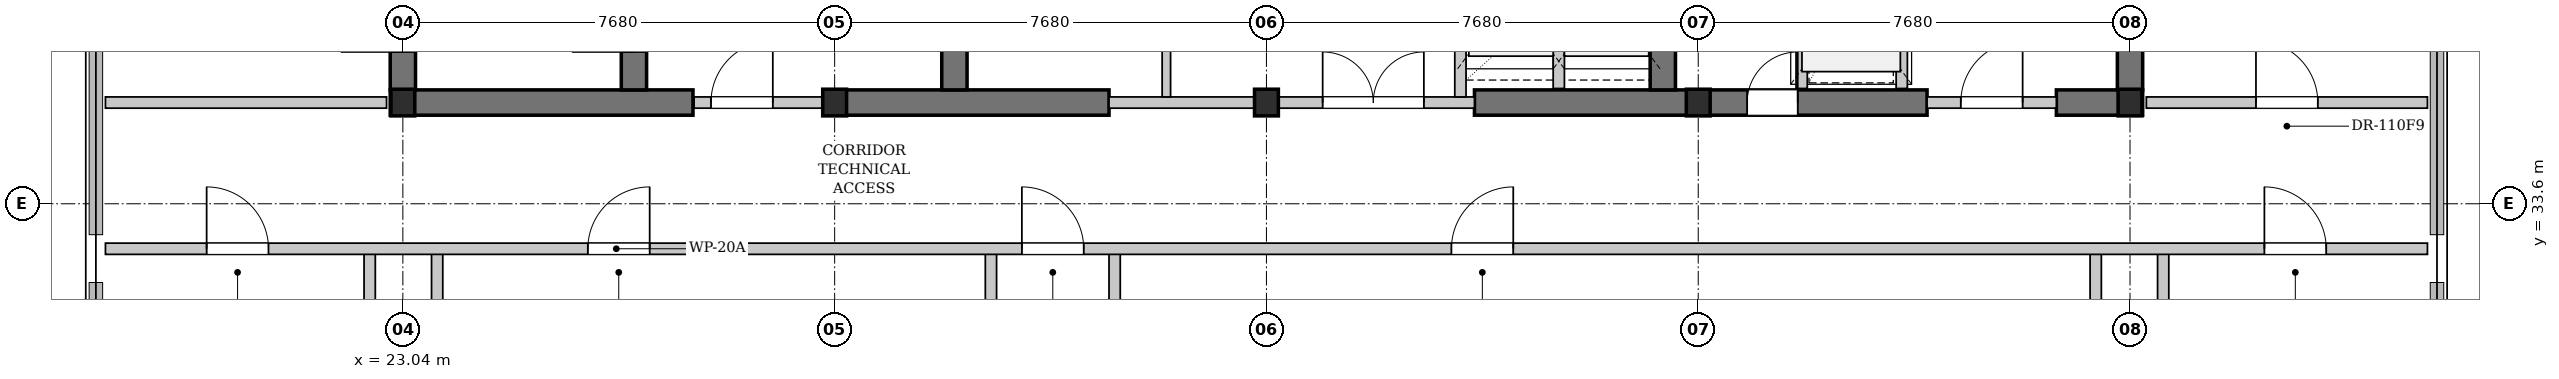
"""IFC4 building model, lengths in metres.
Left out: names, types, materials, properties, quantities, classifications, styles, units other than length and angle.
Written with IfcOpenShell. Run it as: python <this file> out.ifc"""

import sys

from ifc_helpers import new_model, si_unit, direction, frame, frame_2d, origin, origin_2d, place, context, subcontext, project, spatial, rectangle, i_section, extrude, element, fill, save


model = new_model("IFC4")
c1 = context("Model", 3, precision=1e-05, world=origin(), true_north=direction((0.0, 1.0)))
c2 = subcontext(c1, "Body", "Model", "MODEL_VIEW")
j1 = project(units=[si_unit("LENGTHUNIT", "METRE"), si_unit("PLANEANGLEUNIT", "RADIAN")], contexts=[c1])
p1 = place(None, origin())
s1 = spatial("IfcSite", under=j1, at=p1, CompositionType="ELEMENT")
p2 = place(p1, origin())
s2 = spatial("IfcBuilding", under=s1, at=p2, CompositionType="ELEMENT")
p3 = place(p2, frame((0.0, 0.0, 137.3)))
s3 = spatial("IfcBuildingStorey", under=s2, at=p3, CompositionType="ELEMENT", Elevation=137.3)
p4 = place(p3, frame((22.815, 35.4, 0.0), z_axis=(0.0, 0.0, 1.0), x_axis=(1.0, 0.0, 0.0)))
e1 = element("IfcWall", 1, at=p4, inside=s3, PredefinedType="SHEAR", context=c2, shape_type="SweptSolid", body=[
    extrude(rectangle(XDim=5.385, YDim=0.45, at=frame_2d((2.692, 0.0))), origin(), (0.0, 0.0, 1.0), 3.68),
])
p5 = place(p3, frame((30.72, 35.4, 0.0), z_axis=(0.0, 0.0, 1.0), x_axis=(1.0, 0.0, 0.0)))
e2 = element("IfcWall", 2, at=p5, inside=s3, PredefinedType="SHEAR", context=c2, shape_type="SweptSolid", body=[
    extrude(rectangle(XDim=4.88, YDim=0.45, at=frame_2d((2.44, 0.0))), origin(), (0.0, 0.0, 1.0), 3.68),
])
p6 = place(p3, frame((42.1, 35.4, 0.0), z_axis=(0.0, 0.0, 1.0), x_axis=(1.0, 0.0, 0.0)))
e3 = element("IfcWall", 3, at=p6, inside=s3, PredefinedType="SHEAR", context=c2, shape_type="SweptSolid", body=[
    extrude(rectangle(XDim=8.05, YDim=0.45, at=frame_2d((4.025, 0.0))), origin(), (0.0, 0.0, 1.0), 3.68),
])
p7 = place(p6, frame((4.85, 0.0, 0.0)))
e4 = element("IfcOpeningElement", 4, at=p7, cuts=e3, PredefinedType="OPENING", context=c2, shape_type="SweptSolid", body=[
    extrude(rectangle(XDim=0.9, YDim=2.15, at=frame_2d((0.45, 1.075))), frame((0.0, 0.235, 0.0), z_axis=(0.0, -1.0, 0.0), x_axis=(1.0, 0.0, 0.0)), (0.0, 0.0, 1.0), 0.47),
])
p8 = place(p3, frame((52.45, 35.4, 0.0), z_axis=(0.0, 0.0, 1.0), x_axis=(1.0, 0.0, 0.0)))
e5 = element("IfcWall", 5, at=p8, inside=s3, PredefinedType="SHEAR", context=c2, shape_type="SweptSolid", body=[
    extrude(rectangle(XDim=1.535, YDim=0.45, at=frame_2d((0.768, 0.0))), origin(), (0.0, 0.0, 1.0), 3.68),
])
p9 = place(p3, frame((23.04, 35.625, 0.0), z_axis=(0.0, 0.0, 1.0), x_axis=(0.0, 1.0, 0.0)))
e6 = element("IfcWall", 6, at=p9, inside=s3, PredefinedType="SHEAR", context=c2, shape_type="SweptSolid", body=[
    extrude(rectangle(XDim=10.35, YDim=0.45, at=frame_2d((5.175, 0.0))), origin(), (0.0, 0.0, 1.0), 3.68),
])
p10 = place(p9, frame((0.675, 0.0, 0.0)))
e7 = element("IfcOpeningElement", 7, at=p10, cuts=e6, PredefinedType="OPENING", context=c2, shape_type="SweptSolid", body=[
    extrude(rectangle(XDim=1.1, YDim=2.15, at=frame_2d((0.55, 1.075))), frame((0.0, 0.235, 0.0), z_axis=(0.0, -1.0, 0.0), x_axis=(1.0, 0.0, 0.0)), (0.0, 0.0, 1.0), 0.47),
])
p11 = place(p3, frame((27.15, 35.625, 0.0), z_axis=(0.0, 0.0, 1.0), x_axis=(0.0, 1.0, 0.0)))
e8 = element("IfcWall", 8, at=p11, inside=s3, PredefinedType="SHEAR", context=c2, shape_type="SweptSolid", body=[
    extrude(rectangle(XDim=10.35, YDim=0.45, at=frame_2d((5.175, 0.0))), origin(), (0.0, 0.0, 1.0), 3.68),
])
p12 = place(p11, frame((0.675, 0.0, 0.0)))
e9 = element("IfcOpeningElement", 9, at=p12, cuts=e8, PredefinedType="OPENING", context=c2, shape_type="SweptSolid", body=[
    extrude(rectangle(XDim=1.1, YDim=2.15, at=frame_2d((0.55, 1.075))), frame((0.0, 0.235, 0.0), z_axis=(0.0, -1.0, 0.0), x_axis=(1.0, 0.0, 0.0)), (0.0, 0.0, 1.0), 0.47),
])
for number, where, z_axis, x_axis in (
    (10, (32.85, 35.625, 0.0), (0.0, 0.0, 1.0), (0.0, 1.0, 0.0)),
    (11, (45.45, 35.625, 0.0), (0.0, 0.0, 1.0), (0.0, 1.0, 0.0)),
    (12, (53.76, 35.625, 0.0), (0.0, 0.0, 1.0), (0.0, 1.0, 0.0)),
):
    element("IfcWall", number, at=place(p3, frame(where, z_axis=z_axis, x_axis=x_axis)), inside=s3, PredefinedType="SHEAR", context=c2, shape_type="SweptSolid", body=[
        extrude(rectangle(XDim=10.35, YDim=0.45, at=frame_2d((5.175, 0.0))), origin(), (0.0, 0.0, 1.0), 3.68),
    ])
for number, where, z_axis, x_axis in (
    (13, (23.04, 35.4, 0.0), (0.0, 0.0, 1.0), (1.0, 0.0, 0.0)),
    (14, (30.72, 35.4, 0.0), (0.0, 0.0, 1.0), (1.0, 0.0, 0.0)),
    (15, (38.4, 35.4, 0.0), (0.0, 0.0, 1.0), (1.0, 0.0, 0.0)),
    (16, (46.08, 35.4, 0.0), (0.0, 0.0, 1.0), (1.0, 0.0, 0.0)),
    (17, (53.76, 35.4, 0.0), (0.0, 0.0, 1.0), (1.0, 0.0, 0.0)),
):
    element("IfcColumn", number, at=place(p3, frame(where, z_axis=z_axis, x_axis=x_axis)), inside=s3, PredefinedType="COLUMN", context=c2, shape_type="SweptSolid", body=[
        extrude(i_section(OverallWidth=0.424, OverallDepth=0.474, WebThickness=0.047, FlangeThickness=0.077, FilletRadius=0.015, at=origin_2d()), origin(), (0.0, 0.0, 1.0), 3.9),
    ])
p13 = place(p3, frame((28.22, 35.4, 0.0), z_axis=(0.0, 0.0, 1.0), x_axis=(1.0, 0.0, 0.0)))
e18 = element("IfcWall", 18, at=p13, inside=s3, PredefinedType="PARTITIONING", context=c2, shape_type="SweptSolid", body=[
    extrude(rectangle(XDim=2.5, YDim=0.2, at=frame_2d((1.25, 0.0))), origin(), (0.0, 0.0, 1.0), 2.765),
])
p14 = place(p13, frame((0.3, 0.0, 0.0)))
e19 = element("IfcOpeningElement", 19, at=p14, cuts=e18, PredefinedType="OPENING", context=c2, shape_type="SweptSolid", body=[
    extrude(rectangle(XDim=1.1, YDim=2.15, at=frame_2d((0.55, 1.075))), frame((0.0, 0.11, 0.0), z_axis=(0.0, -1.0, 0.0), x_axis=(1.0, 0.0, 0.0)), (0.0, 0.0, 1.0), 0.22),
])
p15 = place(p3, frame((35.6, 35.4, 0.0), z_axis=(0.0, 0.0, 1.0), x_axis=(1.0, 0.0, 0.0)))
e20 = element("IfcWall", 20, at=p15, inside=s3, PredefinedType="PARTITIONING", context=c2, shape_type="SweptSolid", body=[
    extrude(rectangle(XDim=6.5, YDim=0.2, at=frame_2d((3.25, 0.0))), origin(), (0.0, 0.0, 1.0), 2.765),
])
p16 = place(p15, frame((3.8, 0.0, 0.0)))
e21 = element("IfcOpeningElement", 21, at=p16, cuts=e20, PredefinedType="OPENING", context=c2, shape_type="SweptSolid", body=[
    extrude(rectangle(XDim=1.8, YDim=2.3, at=frame_2d((0.9, 1.15))), frame((0.0, 0.11, 0.0), z_axis=(0.0, -1.0, 0.0), x_axis=(1.0, 0.0, 0.0)), (0.0, 0.0, 1.0), 0.22),
])
p17 = place(p3, frame((36.62, 35.5, 0.0), z_axis=(0.0, 0.0, 1.0), x_axis=(0.0, 1.0, 0.0)))
e22 = element("IfcWall", 22, at=p17, inside=s3, PredefinedType="PARTITIONING", context=c2, shape_type="SweptSolid", body=[
    extrude(rectangle(XDim=10.42, YDim=0.15, at=frame_2d((5.21, 0.0))), origin(), (0.0, 0.0, 1.0), 3.68),
])
p18 = place(p17, frame((3.92, 0.0, 0.0)))
e23 = element("IfcOpeningElement", 23, at=p18, cuts=e22, PredefinedType="OPENING", context=c2, shape_type="SweptSolid", body=[
    extrude(rectangle(XDim=0.9, YDim=2.15, at=frame_2d((0.45, 1.075))), frame((0.0, 0.085, 0.0), z_axis=(0.0, -1.0, 0.0), x_axis=(1.0, 0.0, 0.0)), (0.0, 0.0, 1.0), 0.17),
])
p19 = place(p17, frame((5.85, 0.0, 0.0)))
e24 = element("IfcOpeningElement", 24, at=p19, cuts=e22, PredefinedType="OPENING", context=c2, shape_type="SweptSolid", body=[
    extrude(rectangle(XDim=0.9, YDim=2.15, at=frame_2d((0.45, 1.075))), frame((0.0, 0.085, 0.0), z_axis=(0.0, -1.0, 0.0), x_axis=(1.0, 0.0, 0.0)), (0.0, 0.0, 1.0), 0.17),
])
p20 = place(p3, frame((43.6, 35.65, 0.0), z_axis=(0.0, 0.0, 1.0), x_axis=(0.0, 1.0, 0.0)))
e25 = element("IfcWall", 25, at=p20, inside=s3, PredefinedType="PARTITIONING", context=c2, shape_type="SweptSolid", body=[
    extrude(rectangle(XDim=3.25, YDim=0.2, at=frame_2d((1.625, 0.0))), origin(), (0.0, 0.0, 1.0), 3.68),
])
p21 = place(p3, frame((41.85, 35.5, 0.0), z_axis=(0.0, 0.0, 1.0), x_axis=(0.0, 1.0, 0.0)))
e26 = element("IfcWall", 26, at=p21, inside=s3, PredefinedType="PARTITIONING", context=c2, shape_type="SweptSolid", body=[
    extrude(rectangle(XDim=3.4, YDim=0.2, at=frame_2d((1.7, 0.0))), origin(), (0.0, 0.0, 1.0), 3.68),
])
p22 = place(p3, frame((50.15, 35.4, 0.0), z_axis=(0.0, 0.0, 1.0), x_axis=(1.0, 0.0, 0.0)))
e27 = element("IfcWall", 27, at=p22, inside=s3, PredefinedType="PARTITIONING", context=c2, shape_type="SweptSolid", body=[
    extrude(rectangle(XDim=2.3, YDim=0.2, at=frame_2d((1.15, 0.0))), origin(), (0.0, 0.0, 1.0), 2.765),
])
p23 = place(p22, frame((0.6, 0.0, 0.0)))
e28 = element("IfcOpeningElement", 28, at=p23, cuts=e27, PredefinedType="OPENING", context=c2, shape_type="SweptSolid", body=[
    extrude(rectangle(XDim=1.1, YDim=2.15, at=frame_2d((0.55, 1.075))), frame((0.0, 0.11, 0.0), z_axis=(0.0, -1.0, 0.0), x_axis=(1.0, 0.0, 0.0)), (0.0, 0.0, 1.0), 0.22),
])
p24 = place(p3, frame((49.7, 35.65, 0.0), z_axis=(0.0, 0.0, 1.0), x_axis=(0.0, 1.0, 0.0)))
e29 = element("IfcWall", 29, at=p24, inside=s3, PredefinedType="PARTITIONING", context=c2, shape_type="SweptSolid", body=[
    extrude(rectangle(XDim=3.15, YDim=0.2, at=frame_2d((1.575, 0.0))), origin(), (0.0, 0.0, 1.0), 3.68),
])
p25 = place(p24, frame((0.85, 0.0, 0.0)))
e30 = element("IfcOpeningElement", 30, at=p25, cuts=e29, PredefinedType="OPENING", context=c2, shape_type="SweptSolid", body=[
    extrude(rectangle(XDim=1.2, YDim=2.2, at=frame_2d((0.6, 1.1))), frame((0.0, 0.11, 0.0), z_axis=(0.0, -1.0, 0.0), x_axis=(1.0, 0.0, 0.0)), (0.0, 0.0, 1.0), 0.22),
])
p26 = place(p3, frame((47.92, 35.65, 0.0), z_axis=(0.0, 0.0, 1.0), x_axis=(0.0, 1.0, 0.0)))
e31 = element("IfcWall", 31, at=p26, inside=s3, PredefinedType="PARTITIONING", context=c2, shape_type="SweptSolid", body=[
    extrude(rectangle(XDim=3.15, YDim=0.2, at=frame_2d((1.575, 0.0))), origin(), (0.0, 0.0, 1.0), 3.68),
])
p27 = place(p3, frame((17.75, 35.4, 0.0), z_axis=(0.0, 0.0, 1.0), x_axis=(1.0, 0.0, 0.0)))
e32 = element("IfcWall", 32, at=p27, inside=s3, PredefinedType="PARTITIONING", context=c2, shape_type="SweptSolid", body=[
    extrude(rectangle(XDim=5.0, YDim=0.2, at=frame_2d((2.5, 0.0))), origin(), (0.0, 0.0, 1.0), 3.68),
])
p28 = place(p3, frame((54.05, 35.4, 0.0), z_axis=(0.0, 0.0, 1.0), x_axis=(1.0, 0.0, 0.0)))
e33 = element("IfcWall", 33, at=p28, inside=s3, PredefinedType="PARTITIONING", context=c2, shape_type="SweptSolid", body=[
    extrude(rectangle(XDim=5.0, YDim=0.2, at=frame_2d((2.5, 0.0))), origin(), (0.0, 0.0, 1.0), 3.68),
])
p29 = place(p28, frame((1.95, 0.0, 0.0)))
e34 = element("IfcOpeningElement", 34, at=p29, cuts=e33, PredefinedType="OPENING", context=c2, shape_type="SweptSolid", body=[
    extrude(rectangle(XDim=1.1, YDim=2.15, at=frame_2d((0.55, 1.075))), frame((0.0, 0.11, 0.0), z_axis=(0.0, -1.0, 0.0), x_axis=(1.0, 0.0, 0.0)), (0.0, 0.0, 1.0), 0.22),
])
for number, where, z_axis, x_axis in (
    (35, (22.45, 22.98, 0.0), (0.0, 0.0, 1.0), (0.0, 1.0, 0.0)),
    (36, (23.65, 22.98, 0.0), (0.0, 0.0, 1.0), (0.0, 1.0, 0.0)),
    (37, (53.15, 22.98, 0.0), (0.0, 0.0, 1.0), (0.0, 1.0, 0.0)),
    (38, (54.35, 22.98, 0.0), (0.0, 0.0, 1.0), (0.0, 1.0, 0.0)),
):
    element("IfcWall", number, at=place(p3, frame(where, z_axis=z_axis, x_axis=x_axis)), inside=s3, PredefinedType="PARTITIONING", context=c2, shape_type="SweptSolid", body=[
        extrude(rectangle(XDim=9.82, YDim=0.2, at=frame_2d((4.91, 0.0))), origin(), (0.0, 0.0, 1.0), 3.68),
    ])
for number, where, z_axis, x_axis in (
    (39, (33.5, 24.85, 0.0), (0.0, 0.0, 1.0), (0.0, 1.0, 0.0)),
    (40, (35.7, 24.85, 0.0), (0.0, 0.0, 1.0), (0.0, 1.0, 0.0)),
):
    element("IfcWall", number, at=place(p3, frame(where, z_axis=z_axis, x_axis=x_axis)), inside=s3, PredefinedType="PARTITIONING", context=c2, shape_type="SweptSolid", body=[
        extrude(rectangle(XDim=7.95, YDim=0.2, at=frame_2d((3.975, 0.0))), origin(), (0.0, 0.0, 1.0), 3.68),
    ])
p30 = place(p3, frame((17.75, 32.8, 0.0), z_axis=(0.0, 0.0, 1.0), x_axis=(1.0, 0.0, 0.0)))
e41 = element("IfcWall", 41, at=p30, inside=s3, PredefinedType="PARTITIONING", context=c2, shape_type="SweptSolid", body=[
    extrude(rectangle(XDim=41.3, YDim=0.2, at=frame_2d((20.65, 0.0))), origin(), (0.0, 0.0, 1.0), 3.68),
])
p31 = place(p30, frame((1.8, 0.0, 0.0)))
e42 = element("IfcOpeningElement", 42, at=p31, cuts=e41, PredefinedType="OPENING", context=c2, shape_type="SweptSolid", body=[
    extrude(rectangle(XDim=1.1, YDim=2.15, at=frame_2d((0.55, 1.075))), frame((0.0, 0.11, 0.0), z_axis=(0.0, -1.0, 0.0), x_axis=(1.0, 0.0, 0.0)), (0.0, 0.0, 1.0), 0.22),
])
p32 = place(p30, frame((8.58, 0.0, 0.0)))
e43 = element("IfcOpeningElement", 43, at=p32, cuts=e41, PredefinedType="OPENING", context=c2, shape_type="SweptSolid", body=[
    extrude(rectangle(XDim=1.1, YDim=2.15, at=frame_2d((0.55, 1.075))), frame((0.0, 0.11, 0.0), z_axis=(0.0, -1.0, 0.0), x_axis=(1.0, 0.0, 0.0)), (0.0, 0.0, 1.0), 0.22),
])
p33 = place(p30, frame((16.3, 0.0, 0.0)))
e44 = element("IfcOpeningElement", 44, at=p33, cuts=e41, PredefinedType="OPENING", context=c2, shape_type="SweptSolid", body=[
    extrude(rectangle(XDim=1.1, YDim=2.15, at=frame_2d((0.55, 1.075))), frame((0.0, 0.11, 0.0), z_axis=(0.0, -1.0, 0.0), x_axis=(1.0, 0.0, 0.0)), (0.0, 0.0, 1.0), 0.22),
])
p34 = place(p30, frame((23.94, 0.0, 0.0)))
e45 = element("IfcOpeningElement", 45, at=p34, cuts=e41, PredefinedType="OPENING", context=c2, shape_type="SweptSolid", body=[
    extrude(rectangle(XDim=1.1, YDim=2.15, at=frame_2d((0.55, 1.075))), frame((0.0, 0.11, 0.0), z_axis=(0.0, -1.0, 0.0), x_axis=(1.0, 0.0, 0.0)), (0.0, 0.0, 1.0), 0.22),
])
p35 = place(p30, frame((38.4, 0.0, 0.0)))
e46 = element("IfcOpeningElement", 46, at=p35, cuts=e41, PredefinedType="OPENING", context=c2, shape_type="SweptSolid", body=[
    extrude(rectangle(XDim=1.1, YDim=2.15, at=frame_2d((0.55, 1.075))), frame((0.0, 0.11, 0.0), z_axis=(0.0, -1.0, 0.0), x_axis=(1.0, 0.0, 0.0)), (0.0, 0.0, 1.0), 0.22),
])
p36 = place(p14, origin())
e47 = element("IfcDoor", 47, at=p36, inside=s3, OperationType="SINGLE_SWING_RIGHT", PredefinedType="DOOR", context=c2, shape_type="SweptSolid", body=[
    extrude(rectangle(XDim=1.1, YDim=2.15, at=frame_2d((0.55, 1.075))), frame((0.0, 0.025, 0.0), z_axis=(0.0, -1.0, 0.0), x_axis=(1.0, 0.0, 0.0)), (0.0, 0.0, 1.0), 0.05),
])
fill(e19, e47)
p37 = place(p16, origin())
e48 = element("IfcDoor", 48, at=p37, inside=s3, OperationType="DOUBLE_DOOR_SINGLE_SWING", PredefinedType="DOOR", context=c2, shape_type="SweptSolid", body=[
    extrude(rectangle(XDim=1.8, YDim=2.3, at=frame_2d((0.9, 1.15))), frame((0.0, 0.025, 0.0), z_axis=(0.0, -1.0, 0.0), x_axis=(1.0, 0.0, 0.0)), (0.0, 0.0, 1.0), 0.05),
])
fill(e21, e48)
p38 = place(p23, origin())
e49 = element("IfcDoor", 49, at=p38, inside=s3, OperationType="SINGLE_SWING_RIGHT", PredefinedType="DOOR", context=c2, shape_type="SweptSolid", body=[
    extrude(rectangle(XDim=1.1, YDim=2.15, at=frame_2d((0.55, 1.075))), frame((0.0, 0.025, 0.0), z_axis=(0.0, -1.0, 0.0), x_axis=(1.0, 0.0, 0.0)), (0.0, 0.0, 1.0), 0.05),
])
fill(e28, e49)
p39 = place(p29, origin())
e50 = element("IfcDoor", 50, at=p39, inside=s3, OperationType="SINGLE_SWING_LEFT", PredefinedType="DOOR", context=c2, shape_type="SweptSolid", body=[
    extrude(rectangle(XDim=1.1, YDim=2.15, at=frame_2d((0.55, 1.075))), frame((0.0, 0.025, 0.0), z_axis=(0.0, -1.0, 0.0), x_axis=(1.0, 0.0, 0.0)), (0.0, 0.0, 1.0), 0.05),
])
fill(e34, e50)
p40 = place(p31, origin())
e51 = element("IfcDoor", 51, at=p40, inside=s3, OperationType="SINGLE_SWING_LEFT", PredefinedType="DOOR", context=c2, shape_type="SweptSolid", body=[
    extrude(rectangle(XDim=1.1, YDim=2.15, at=frame_2d((0.55, 1.075))), frame((0.0, 0.025, 0.0), z_axis=(0.0, -1.0, 0.0), x_axis=(1.0, 0.0, 0.0)), (0.0, 0.0, 1.0), 0.05),
])
fill(e42, e51)
p41 = place(p32, origin())
e52 = element("IfcDoor", 52, at=p41, inside=s3, OperationType="SINGLE_SWING_RIGHT", PredefinedType="DOOR", context=c2, shape_type="SweptSolid", body=[
    extrude(rectangle(XDim=1.1, YDim=2.15, at=frame_2d((0.55, 1.075))), frame((0.0, 0.025, 0.0), z_axis=(0.0, -1.0, 0.0), x_axis=(1.0, 0.0, 0.0)), (0.0, 0.0, 1.0), 0.05),
])
fill(e43, e52)
p42 = place(p33, origin())
e53 = element("IfcDoor", 53, at=p42, inside=s3, OperationType="SINGLE_SWING_LEFT", PredefinedType="DOOR", context=c2, shape_type="SweptSolid", body=[
    extrude(rectangle(XDim=1.1, YDim=2.15, at=frame_2d((0.55, 1.075))), frame((0.0, 0.025, 0.0), z_axis=(0.0, -1.0, 0.0), x_axis=(1.0, 0.0, 0.0)), (0.0, 0.0, 1.0), 0.05),
])
fill(e44, e53)
p43 = place(p34, origin())
e54 = element("IfcDoor", 54, at=p43, inside=s3, OperationType="SINGLE_SWING_RIGHT", PredefinedType="DOOR", context=c2, shape_type="SweptSolid", body=[
    extrude(rectangle(XDim=1.1, YDim=2.15, at=frame_2d((0.55, 1.075))), frame((0.0, 0.025, 0.0), z_axis=(0.0, -1.0, 0.0), x_axis=(1.0, 0.0, 0.0)), (0.0, 0.0, 1.0), 0.05),
])
fill(e45, e54)
p44 = place(p35, origin())
e55 = element("IfcDoor", 55, at=p44, inside=s3, OperationType="SINGLE_SWING_LEFT", PredefinedType="DOOR", context=c2, shape_type="SweptSolid", body=[
    extrude(rectangle(XDim=1.1, YDim=2.15, at=frame_2d((0.55, 1.075))), frame((0.0, 0.025, 0.0), z_axis=(0.0, -1.0, 0.0), x_axis=(1.0, 0.0, 0.0)), (0.0, 0.0, 1.0), 0.05),
])
fill(e46, e55)
p45 = place(p7, origin())
e56 = element("IfcDoor", 56, at=p45, inside=s3, OperationType="SINGLE_SWING_RIGHT", PredefinedType="DOOR", context=c2, shape_type="SweptSolid", body=[
    extrude(rectangle(XDim=0.9, YDim=2.15, at=frame_2d((0.45, 1.075))), frame((0.0, 0.025, 0.0), z_axis=(0.0, -1.0, 0.0), x_axis=(1.0, 0.0, 0.0)), (0.0, 0.0, 1.0), 0.05),
])
fill(e4, e56)
save(model, sys.argv[1])
